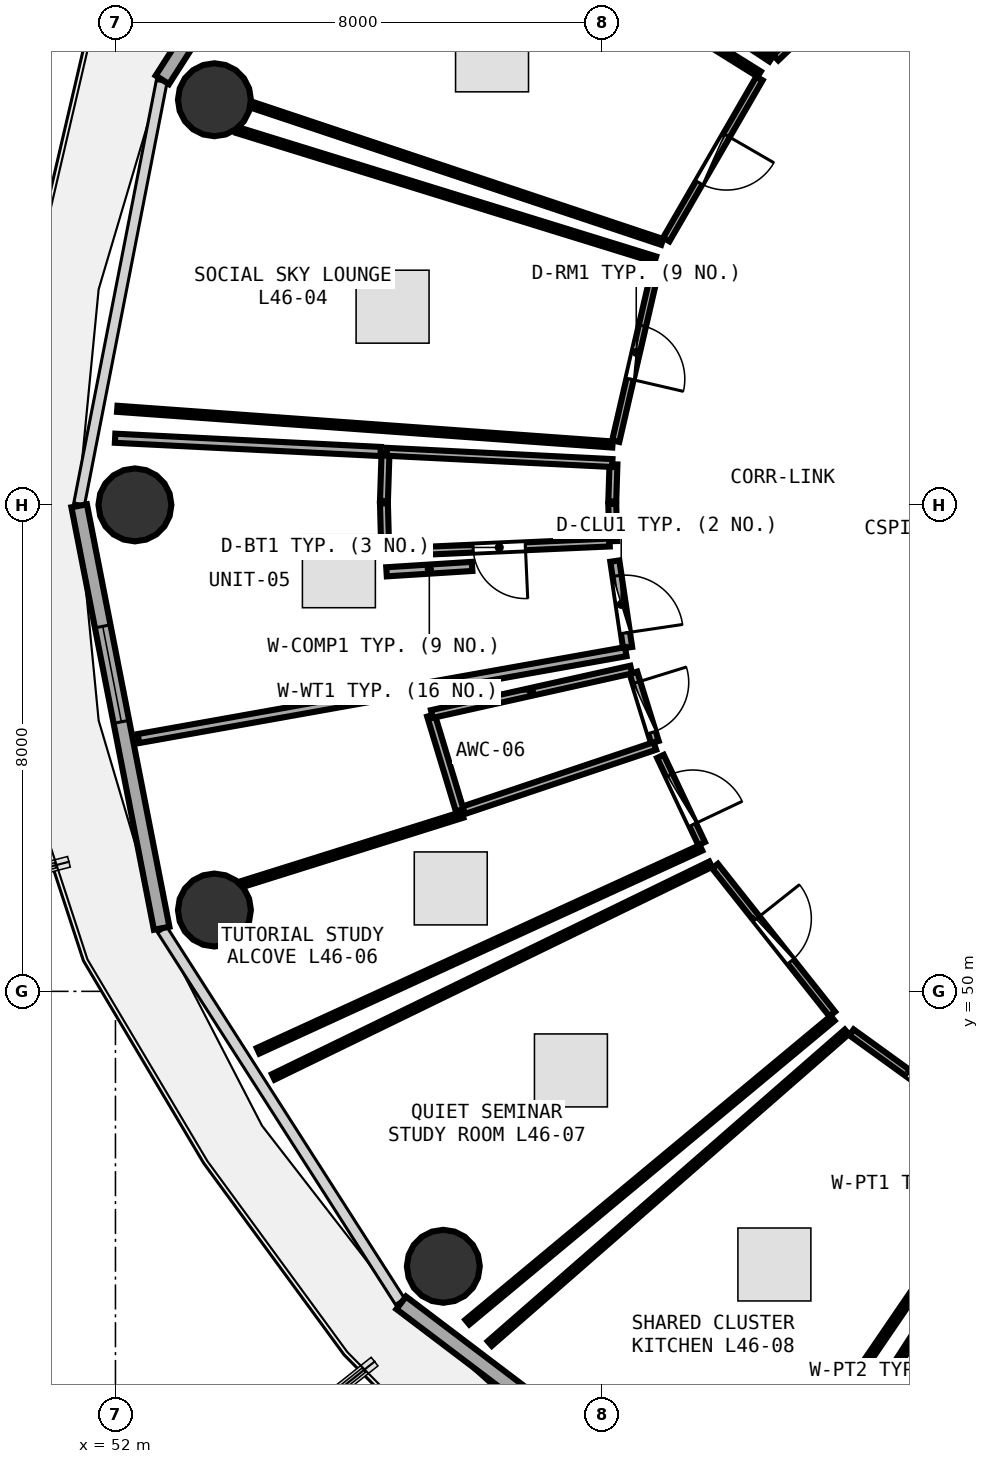
"""IFC4 building model, lengths in metres.
Left out: names, types, materials, properties, quantities, classifications, styles, units other than length and angle.
Written with IfcOpenShell. Run it as: python <this file> out.ifc"""

import sys

from ifc_helpers import new_model, si_unit, direction, frame, frame_2d, origin, origin_2d, place, context, subcontext, project, spatial, rectangle, circle, extrude, element, fill, save


model = new_model("IFC4")
c1 = context("Model", 3, precision=1e-05, world=origin(), true_north=direction((0.0, 1.0)))
c2 = subcontext(c1, "Body", "Model", "MODEL_VIEW")
j1 = project(units=[si_unit("LENGTHUNIT", "METRE"), si_unit("PLANEANGLEUNIT", "RADIAN")], contexts=[c1])
p1 = place(None, origin())
s1 = spatial("IfcSite", under=j1, at=p1, CompositionType="ELEMENT")
p2 = place(p1, origin())
s2 = spatial("IfcBuilding", under=s1, at=p2, CompositionType="ELEMENT")
p3 = place(p2, frame((0.0, 0.0, 180.6)))
s3 = spatial("IfcBuildingStorey", under=s2, at=p3, CompositionType="ELEMENT", Elevation=180.6)
for number, where, z_axis, x_axis in (
    (1, (53.627, 64.663, 0.0), (0.0, 0.0, 1.0), (1.0, 0.0, 0.0)),
    (2, (52.32, 58.0, 0.0), (0.0, 0.0, 1.0), (1.0, 0.0, 0.0)),
    (3, (53.627, 51.337, 0.0), (0.0, 0.0, 1.0), (1.0, 0.0, 0.0)),
    (4, (57.392, 45.479, 0.0), (0.0, 0.0, 1.0), (1.0, 0.0, 0.0)),
):
    element("IfcColumn", number, at=place(p3, frame(where, z_axis=z_axis, x_axis=x_axis)), inside=s3, PredefinedType="COLUMN", context=c2, shape_type="SweptSolid", body=[
        extrude(circle(Radius=0.6, at=origin_2d()), origin(), (0.0, 0.0, 1.0), 3.75),
    ])
p4 = place(p3, frame((56.679, 71.1, 0.0), z_axis=(0.0, 0.0, 1.0), x_axis=(-0.538801521808, -0.842432739213, 0.0)))
e5 = element("IfcWall", 5, at=p4, inside=s3, PredefinedType="SOLIDWALL", context=c2, shape_type="SweptSolid", body=[
    extrude(rectangle(XDim=7.253, YDim=0.26, at=frame_2d((3.627, 0.0))), origin(), (0.0, 0.0, 1.0), 3.475),
])
p5 = place(p4, frame((3.152, 0.0, 0.0)))
e6 = element("IfcOpeningElement", 6, at=p5, cuts=e5, PredefinedType="OPENING", context=c2, shape_type="SweptSolid", body=[
    extrude(rectangle(XDim=0.95, YDim=2.1, at=frame_2d((0.475, 1.05))), frame((0.0, 0.14, 0.0), z_axis=(0.0, -1.0, 0.0), x_axis=(1.0, 0.0, 0.0)), (0.0, 0.0, 1.0), 0.28),
])
p6 = place(p4, frame((4.452, 0.0, 0.85)))
e7 = element("IfcOpeningElement", 7, at=p6, cuts=e5, PredefinedType="OPENING", context=c2, shape_type="SweptSolid", body=[
    extrude(rectangle(XDim=1.2, YDim=1.45, at=frame_2d((0.6, 0.725))), frame((0.0, 0.14, 0.0), z_axis=(0.0, -1.0, 0.0), x_axis=(1.0, 0.0, 0.0)), (0.0, 0.0, 1.0), 0.28),
])
p7 = place(p3, frame((51.403, 57.985, 0.0), z_axis=(0.0, 0.0, 1.0), x_axis=(0.191716984769, -0.981450252306, 0.0)))
e8 = element("IfcWall", 8, at=p7, inside=s3, PredefinedType="SOLIDWALL", context=c2, shape_type="SweptSolid", body=[
    extrude(rectangle(XDim=7.079, YDim=0.26, at=frame_2d((3.54, 0.0))), origin(), (0.0, 0.0, 1.0), 3.475),
])
p8 = place(p7, frame((2.02, 0.0, 0.85)))
e9 = element("IfcOpeningElement", 9, at=p8, cuts=e8, PredefinedType="OPENING", context=c2, shape_type="SweptSolid", body=[
    extrude(rectangle(XDim=1.6, YDim=1.45, at=frame_2d((0.8, 0.725))), frame((0.0, 0.14, 0.0), z_axis=(0.0, -1.0, 0.0), x_axis=(1.0, 0.0, 0.0)), (0.0, 0.0, 1.0), 0.28),
])
p9 = place(p3, frame((56.699, 44.878, 0.0), z_axis=(0.0, 0.0, 1.0), x_axis=(0.797163719609, -0.603763202042, 0.0)))
e10 = element("IfcWall", 10, at=p9, inside=s3, PredefinedType="SOLIDWALL", context=c2, shape_type="SweptSolid", body=[
    extrude(rectangle(XDim=7.512, YDim=0.26, at=frame_2d((3.756, 0.0))), origin(), (0.0, 0.0, 1.0), 3.475),
])
p10 = place(p9, frame((2.956, 0.0, 0.85)))
e11 = element("IfcOpeningElement", 11, at=p10, cuts=e10, PredefinedType="OPENING", context=c2, shape_type="SweptSolid", body=[
    extrude(rectangle(XDim=1.6, YDim=1.45, at=frame_2d((0.8, 0.725))), frame((0.0, 0.14, 0.0), z_axis=(0.0, -1.0, 0.0), x_axis=(1.0, 0.0, 0.0)), (0.0, 0.0, 1.0), 0.28),
])
p11 = place(p3, frame((65.135, 67.531, 0.0), z_axis=(0.0, 0.0, 1.0), x_axis=(-0.722401093559, -0.691474265627, 0.0)))
e12 = element("IfcWall", 12, at=p11, inside=s3, PredefinedType="PARTITIONING", context=c2, shape_type="SweptSolid", body=[
    extrude(rectangle(XDim=3.15, YDim=0.12, at=frame_2d((1.575, 0.0))), origin(), (0.0, 0.0, 1.0), 2.975),
])
p12 = place(p11, frame((1.125, 0.0, 0.0)))
e13 = element("IfcOpeningElement", 13, at=p12, cuts=e12, PredefinedType="OPENING", context=c2, shape_type="SweptSolid", body=[
    extrude(rectangle(XDim=0.9, YDim=2.08, at=frame_2d((0.45, 1.04))), frame((0.0, 0.07, 0.0), z_axis=(0.0, -1.0, 0.0), x_axis=(1.0, 0.0, 0.0)), (0.0, 0.0, 1.0), 0.14),
])
p13 = place(p3, frame((62.591, 65.012, 0.0), z_axis=(0.0, 0.0, 1.0), x_axis=(-0.500746842293, -0.865593784598, 0.0)))
e14 = element("IfcWall", 14, at=p13, inside=s3, PredefinedType="PARTITIONING", context=c2, shape_type="SweptSolid", body=[
    extrude(rectangle(XDim=3.059, YDim=0.12, at=frame_2d((1.53, 0.0))), origin(), (0.0, 0.0, 1.0), 2.975),
])
p14 = place(p13, frame((1.08, 0.0, 0.0)))
e15 = element("IfcOpeningElement", 15, at=p14, cuts=e14, PredefinedType="OPENING", context=c2, shape_type="SweptSolid", body=[
    extrude(rectangle(XDim=0.9, YDim=2.08, at=frame_2d((0.45, 1.04))), frame((0.0, 0.07, 0.0), z_axis=(0.0, -1.0, 0.0), x_axis=(1.0, 0.0, 0.0)), (0.0, 0.0, 1.0), 0.14),
])
p15 = place(p3, frame((60.903, 61.968, 0.0), z_axis=(0.0, 0.0, 1.0), x_axis=(-0.225317744346, -0.974285335045, 0.0)))
e16 = element("IfcWall", 16, at=p15, inside=s3, PredefinedType="PARTITIONING", context=c2, shape_type="SweptSolid", body=[
    extrude(rectangle(XDim=2.996, YDim=0.12, at=frame_2d((1.498, 0.0))), origin(), (0.0, 0.0, 1.0), 3.48),
])
p16 = place(p15, frame((1.048, 0.0, 0.0)))
e17 = element("IfcOpeningElement", 17, at=p16, cuts=e16, PredefinedType="OPENING", context=c2, shape_type="SweptSolid", body=[
    extrude(rectangle(XDim=0.9, YDim=2.08, at=frame_2d((0.45, 1.04))), frame((0.0, 0.07, 0.0), z_axis=(0.0, -1.0, 0.0), x_axis=(1.0, 0.0, 0.0)), (0.0, 0.0, 1.0), 0.14),
])
p17 = place(p3, frame((60.127, 57.381, 0.0), z_axis=(0.0, 0.0, 1.0), x_axis=(-0.998998516644, -0.044743309488, 0.0)))
e18 = element("IfcWall", 18, at=p17, inside=s3, PredefinedType="PLUMBINGWALL", context=c2, shape_type="SweptSolid", body=[
    extrude(rectangle(XDim=3.634, YDim=0.13, at=frame_2d((1.817, 0.0))), origin(), (0.0, 0.0, 1.0), 3.175),
])
p18 = place(p17, frame((1.387, 0.0, 0.0)))
e19 = element("IfcOpeningElement", 19, at=p18, cuts=e18, PredefinedType="OPENING", context=c2, shape_type="SweptSolid", body=[
    extrude(rectangle(XDim=0.86, YDim=2.05, at=frame_2d((0.43, 1.025))), frame((0.0, 0.075, 0.0), z_axis=(0.0, -1.0, 0.0), x_axis=(1.0, 0.0, 0.0)), (0.0, 0.0, 1.0), 0.15),
])
p19 = place(p3, frame((60.213, 57.076, 0.0), z_axis=(0.0, 0.0, 1.0), x_axis=(0.146099718117, -0.98926986832, 0.0)))
e20 = element("IfcWall", 20, at=p19, inside=s3, PredefinedType="PARTITIONING", context=c2, shape_type="SweptSolid", body=[
    extrude(rectangle(XDim=1.439, YDim=0.15, at=frame_2d((0.719, 0.0))), origin(), (0.0, 0.0, 1.0), 3.48),
])
p20 = place(p19, frame((0.244, 0.0, 0.0)))
e21 = element("IfcOpeningElement", 21, at=p20, cuts=e20, PredefinedType="OPENING", context=c2, shape_type="SweptSolid", body=[
    extrude(rectangle(XDim=0.95, YDim=2.08, at=frame_2d((0.475, 1.04))), frame((0.0, 0.085, 0.0), z_axis=(0.0, -1.0, 0.0), x_axis=(1.0, 0.0, 0.0)), (0.0, 0.0, 1.0), 0.17),
])
p21 = place(p3, frame((60.519, 55.239, 0.0), z_axis=(0.0, 0.0, 1.0), x_axis=(0.296096905528, -0.955157904504, 0.0)))
e22 = element("IfcWall", 22, at=p21, inside=s3, PredefinedType="PLUMBINGWALL", context=c2, shape_type="SweptSolid", body=[
    extrude(rectangle(XDim=1.194, YDim=0.13, at=frame_2d((0.597, 0.0))), origin(), (0.0, 0.0, 1.0), 3.48),
])
p22 = place(p21, frame((0.167, 0.0, 0.0)))
e23 = element("IfcOpeningElement", 23, at=p22, cuts=e22, PredefinedType="OPENING", context=c2, shape_type="SweptSolid", body=[
    extrude(rectangle(XDim=0.86, YDim=2.05, at=frame_2d((0.43, 1.025))), frame((0.0, 0.075, 0.0), z_axis=(0.0, -1.0, 0.0), x_axis=(1.0, 0.0, 0.0)), (0.0, 0.0, 1.0), 0.15),
])
p23 = place(p3, frame((60.963, 53.864, 0.0), z_axis=(0.0, 0.0, 1.0), x_axis=(0.427397920828, -0.904063613509, 0.0)))
e24 = element("IfcWall", 24, at=p23, inside=s3, PredefinedType="PARTITIONING", context=c2, shape_type="SweptSolid", body=[
    extrude(rectangle(XDim=1.586, YDim=0.12, at=frame_2d((0.793, 0.0))), origin(), (0.0, 0.0, 1.0), 3.235),
])
p24 = place(p23, frame((0.343, 0.0, 0.0)))
e25 = element("IfcOpeningElement", 25, at=p24, cuts=e24, PredefinedType="OPENING", context=c2, shape_type="SweptSolid", body=[
    extrude(rectangle(XDim=0.9, YDim=2.08, at=frame_2d((0.45, 1.04))), frame((0.0, 0.07, 0.0), z_axis=(0.0, -1.0, 0.0), x_axis=(1.0, 0.0, 0.0)), (0.0, 0.0, 1.0), 0.14),
])
p25 = place(p3, frame((61.86, 52.06, 0.0), z_axis=(0.0, 0.0, 1.0), x_axis=(0.621061577605, -0.783761773005, 0.0)))
e26 = element("IfcWall", 26, at=p25, inside=s3, PredefinedType="PARTITIONING", context=c2, shape_type="SweptSolid", body=[
    extrude(rectangle(XDim=3.103, YDim=0.12, at=frame_2d((1.552, 0.0))), origin(), (0.0, 0.0, 1.0), 2.975),
])
p26 = place(p25, frame((1.102, 0.0, 0.0)))
e27 = element("IfcOpeningElement", 27, at=p26, cuts=e26, PredefinedType="OPENING", context=c2, shape_type="SweptSolid", body=[
    extrude(rectangle(XDim=0.9, YDim=2.08, at=frame_2d((0.45, 1.04))), frame((0.0, 0.07, 0.0), z_axis=(0.0, -1.0, 0.0), x_axis=(1.0, 0.0, 0.0)), (0.0, 0.0, 1.0), 0.14),
])
p27 = place(p3, frame((64.106, 49.325, 0.0), z_axis=(0.0, 0.0, 1.0), x_axis=(0.810538273734, -0.585685672364, 0.0)))
e28 = element("IfcWall", 28, at=p27, inside=s3, PredefinedType="PARTITIONING", context=c2, shape_type="SweptSolid", body=[
    extrude(rectangle(XDim=3.198, YDim=0.12, at=frame_2d((1.599, 0.0))), origin(), (0.0, 0.0, 1.0), 2.975),
])
p28 = place(p27, frame((1.149, 0.0, 0.0)))
e29 = element("IfcOpeningElement", 29, at=p28, cuts=e28, PredefinedType="OPENING", context=c2, shape_type="SweptSolid", body=[
    extrude(rectangle(XDim=0.9, YDim=2.08, at=frame_2d((0.45, 1.04))), frame((0.0, 0.07, 0.0), z_axis=(0.0, -1.0, 0.0), x_axis=(1.0, 0.0, 0.0)), (0.0, 0.0, 1.0), 0.14),
])
p29 = place(p3, frame((62.783, 65.334, 0.0), z_axis=(0.0, 0.0, 1.0), x_axis=(-0.835790537916, 0.549048428401, 0.0)))
e30 = element("IfcWall", 30, at=p29, inside=s3, PredefinedType="PARTITIONING", context=c2, shape_type="SweptSolid", body=[
    extrude(rectangle(XDim=7.903, YDim=0.1, at=frame_2d((3.952, 0.0))), origin(), (0.0, 0.0, 1.0), 3.025),
])
p30 = place(p3, frame((60.991, 62.325, 0.0), z_axis=(0.0, 0.0, 1.0), x_axis=(-0.948483978449, 0.316825097847, 0.0)))
e31 = element("IfcWall", 31, at=p30, inside=s3, PredefinedType="PARTITIONING", context=c2, shape_type="SweptSolid", body=[
    extrude(rectangle(XDim=7.111, YDim=0.1, at=frame_2d((3.555, 0.0))), origin(), (0.0, 0.0, 1.0), 2.975),
])
p31 = place(p3, frame((55.866, 69.277, 0.0), z_axis=(0.0, 0.0, 1.0), x_axis=(0.84851390129, -0.529173090129, 0.0)))
e32 = element("IfcWall", 32, at=p31, inside=s3, PredefinedType="PARTITIONING", context=c2, shape_type="SweptSolid", body=[
    extrude(rectangle(XDim=7.921, YDim=0.1, at=frame_2d((3.96, 0.0))), origin(), (0.0, 0.0, 1.0), 2.975),
])
p32 = place(p3, frame((60.174, 58.993, 0.0), z_axis=(0.0, 0.0, 1.0), x_axis=(-0.997411279475, 0.071907854766, 0.0)))
e33 = element("IfcWall", 33, at=p32, inside=s3, PredefinedType="PARTITIONING", context=c2, shape_type="SweptSolid", body=[
    extrude(rectangle(XDim=8.166, YDim=0.1, at=frame_2d((4.083, 0.0))), origin(), (0.0, 0.0, 1.0), 3.025),
])
p33 = place(p3, frame((54.003, 64.163, 0.0), z_axis=(0.0, 0.0, 1.0), x_axis=(0.955390108929, -0.295346812679, 0.0)))
e34 = element("IfcWall", 34, at=p33, inside=s3, PredefinedType="PARTITIONING", context=c2, shape_type="SweptSolid", body=[
    extrude(rectangle(XDim=7.196, YDim=0.1, at=frame_2d((3.598, 0.0))), origin(), (0.0, 0.0, 1.0), 3.175),
])
p34 = place(p3, frame((60.19, 58.667, 0.0), z_axis=(0.0, 0.0, 1.0), x_axis=(-0.032292682442, -0.999478455326, 0.0)))
e35 = element("IfcWall", 35, at=p34, inside=s3, PredefinedType="PLUMBINGWALL", context=c2, shape_type="SweptSolid", body=[
    extrude(rectangle(XDim=0.612, YDim=0.13, at=frame_2d((0.306, 0.0))), origin(), (0.0, 0.0, 1.0), 2.975),
])
p35 = place(p3, frame((60.17, 58.015, 0.0), z_axis=(0.0, 0.0, 1.0), x_axis=(0.026369723842, -0.99965225837, 0.0)))
e36 = element("IfcWall", 36, at=p35, inside=s3, PredefinedType="PLUMBINGWALL", context=c2, shape_type="SweptSolid", body=[
    extrude(rectangle(XDim=0.611, YDim=0.13, at=frame_2d((0.306, 0.0))), origin(), (0.0, 0.0, 1.0), 2.975),
])
p36 = place(p3, frame((56.437, 57.236, 0.0), z_axis=(0.0, 0.0, 1.0), x_axis=(-0.026607722643, 0.999645951873, 0.0)))
e37 = element("IfcWall", 37, at=p36, inside=s3, PredefinedType="PLUMBINGWALL", context=c2, shape_type="SweptSolid", body=[
    extrude(rectangle(XDim=0.789, YDim=0.13, at=frame_2d((0.395, 0.0))), origin(), (0.0, 0.0, 1.0), 2.975),
])
p37 = place(p3, frame((56.416, 58.065, 0.0), z_axis=(0.0, 0.0, 1.0), x_axis=(0.03247049286, 0.999472694521, 0.0)))
e38 = element("IfcWall", 38, at=p37, inside=s3, PredefinedType="PLUMBINGWALL", context=c2, shape_type="SweptSolid", body=[
    extrude(rectangle(XDim=0.79, YDim=0.13, at=frame_2d((0.395, 0.0))), origin(), (0.0, 0.0, 1.0), 2.975),
])
p38 = place(p3, frame((56.462, 58.873, 0.0), z_axis=(0.0, 0.0, 1.0), x_axis=(0.998757579638, -0.049832691243, 0.0)))
e39 = element("IfcWall", 39, at=p38, inside=s3, PredefinedType="PLUMBINGWALL", context=c2, shape_type="SweptSolid", body=[
    extrude(rectangle(XDim=3.714, YDim=0.13, at=frame_2d((1.857, 0.0))), origin(), (0.0, 0.0, 1.0), 3.175),
])
p39 = place(p3, frame((60.393, 55.586, 0.0), z_axis=(0.0, 0.0, 1.0), x_axis=(-0.984476835755, -0.175514557407, 0.0)))
e40 = element("IfcWall", 40, at=p39, inside=s3, PredefinedType="PARTITIONING", context=c2, shape_type="SweptSolid", body=[
    extrude(rectangle(XDim=8.142, YDim=0.15, at=frame_2d((4.071, 0.0))), origin(), (0.0, 0.0, 1.0), 3.025),
])
p40 = place(p3, frame((51.994, 59.096, 0.0), z_axis=(0.0, 0.0, 1.0), x_axis=(0.998756789481, -0.049848525207, 0.0)))
e41 = element("IfcWall", 41, at=p40, inside=s3, PredefinedType="PARTITIONING", context=c2, shape_type="SweptSolid", body=[
    extrude(rectangle(XDim=4.374, YDim=0.15, at=frame_2d((2.187, 0.0))), origin(), (0.0, 0.0, 1.0), 3.025),
])
p41 = place(p3, frame((56.458, 56.899, 0.0), z_axis=(0.0, 0.0, 1.0), x_axis=(0.998023505666, 0.062841722907, 0.0)))
e42 = element("IfcWall", 42, at=p41, inside=s3, PredefinedType="PARTITIONING", context=c2, shape_type="SweptSolid", body=[
    extrude(rectangle(XDim=1.41, YDim=0.15, at=frame_2d((0.705, 0.0))), origin(), (0.0, 0.0, 1.0), 3.175),
])
p42 = place(p3, frame((60.871, 54.035, 0.0), z_axis=(0.0, 0.0, 1.0), x_axis=(-0.947910298115, -0.318537386704, 0.0)))
e43 = element("IfcWall", 43, at=p42, inside=s3, PredefinedType="PLUMBINGWALL", context=c2, shape_type="SweptSolid", body=[
    extrude(rectangle(XDim=3.36, YDim=0.13, at=frame_2d((1.68, 0.0))), origin(), (0.0, 0.0, 1.0), 3.175),
])
p43 = place(p3, frame((57.661, 52.977, 0.0), z_axis=(0.0, 0.0, 1.0), x_axis=(-0.289861876094, 0.957068489079, 0.0)))
e44 = element("IfcWall", 44, at=p43, inside=s3, PredefinedType="PLUMBINGWALL", context=c2, shape_type="SweptSolid", body=[
    extrude(rectangle(XDim=1.63, YDim=0.13, at=frame_2d((0.815, 0.0))), origin(), (0.0, 0.0, 1.0), 3.48),
])
p44 = place(p3, frame((57.202, 54.56, 0.0), z_axis=(0.0, 0.0, 1.0), x_axis=(0.976027779337, 0.217645983107, 0.0)))
e45 = element("IfcWall", 45, at=p44, inside=s3, PredefinedType="PLUMBINGWALL", context=c2, shape_type="SweptSolid", body=[
    extrude(rectangle(XDim=3.36, YDim=0.13, at=frame_2d((1.68, 0.0))), origin(), (0.0, 0.0, 1.0), 3.175),
])
p45 = place(p3, frame((61.63, 52.359, 0.0), z_axis=(0.0, 0.0, 1.0), x_axis=(-0.909155211227, -0.416457443083, 0.0)))
e46 = element("IfcWall", 46, at=p45, inside=s3, PredefinedType="PARTITIONING", context=c2, shape_type="SweptSolid", body=[
    extrude(rectangle(XDim=8.012, YDim=0.1, at=frame_2d((4.006, 0.0))), origin(), (0.0, 0.0, 1.0), 2.975),
])
p46 = place(p3, frame((54.083, 51.765, 0.0), z_axis=(0.0, 0.0, 1.0), x_axis=(0.954047805858, 0.299654441212, 0.0)))
e47 = element("IfcWall", 47, at=p46, inside=s3, PredefinedType="PARTITIONING", context=c2, shape_type="SweptSolid", body=[
    extrude(rectangle(XDim=3.798, YDim=0.1, at=frame_2d((1.899, 0.0))), origin(), (0.0, 0.0, 1.0), 3.235),
])
p47 = place(p3, frame((63.794, 49.555, 0.0), z_axis=(0.0, 0.0, 1.0), x_axis=(-0.768927769446, -0.639335659396, 0.0)))
e48 = element("IfcWall", 48, at=p47, inside=s3, PredefinedType="PARTITIONING", context=c2, shape_type="SweptSolid", body=[
    extrude(rectangle(XDim=7.812, YDim=0.1, at=frame_2d((3.906, 0.0))), origin(), (0.0, 0.0, 1.0), 2.975),
])
p48 = place(p3, frame((54.595, 48.593, 0.0), z_axis=(0.0, 0.0, 1.0), x_axis=(0.899324003441, 0.437282902518, 0.0)))
e49 = element("IfcWall", 49, at=p48, inside=s3, PredefinedType="PARTITIONING", context=c2, shape_type="SweptSolid", body=[
    extrude(rectangle(XDim=7.997, YDim=0.1, at=frame_2d((3.999, 0.0))), origin(), (0.0, 0.0, 1.0), 2.975),
])
p49 = place(p3, frame((66.723, 47.384, 0.0), z_axis=(0.0, 0.0, 1.0), x_axis=(-0.563521193737, -0.826101606468, 0.0)))
e50 = element("IfcWall", 50, at=p49, inside=s3, PredefinedType="PARTITIONING", context=c2, shape_type="SweptSolid", body=[
    extrude(rectangle(XDim=6.944, YDim=0.1, at=frame_2d((3.472, 0.0))), origin(), (0.0, 0.0, 1.0), 2.975),
])
p50 = place(p3, frame((58.156, 44.208, 0.0), z_axis=(0.0, 0.0, 1.0), x_axis=(0.753307828271, 0.657668089438, 0.0)))
e51 = element("IfcWall", 51, at=p50, inside=s3, PredefinedType="PARTITIONING", context=c2, shape_type="SweptSolid", body=[
    extrude(rectangle(XDim=7.793, YDim=0.1, at=frame_2d((3.897, 0.0))), origin(), (0.0, 0.0, 1.0), 3.025),
])
p51 = place(p3, frame((63.44, 41.689, 0.0), z_axis=(0.0, 0.0, 1.0), x_axis=(0.542254246964, 0.840214455749, 0.0)))
e52 = element("IfcWall", 52, at=p51, inside=s3, PredefinedType="PARTITIONING", context=c2, shape_type="SweptSolid", body=[
    extrude(rectangle(XDim=6.592, YDim=0.1, at=frame_2d((3.296, 0.0))), origin(), (0.0, 0.0, 1.0), 2.975),
])
p52 = place(p8, origin())
e53 = element("IfcWindow", 53, at=p52, inside=s3, PartitioningType="SINGLE_PANEL", PredefinedType="WINDOW", context=c2, shape_type="SweptSolid", body=[
    extrude(rectangle(XDim=1.6, YDim=1.45, at=frame_2d((0.8, 0.725))), frame((0.0, 0.03, 0.0), z_axis=(0.0, -1.0, 0.0), x_axis=(1.0, 0.0, 0.0)), (0.0, 0.0, 1.0), 0.06),
])
fill(e9, e53)
p53 = place(p14, origin())
e54 = element("IfcDoor", 54, at=p53, inside=s3, OperationType="SINGLE_SWING_LEFT", PredefinedType="DOOR", context=c2, shape_type="SweptSolid", body=[
    extrude(rectangle(XDim=0.9, YDim=2.08, at=frame_2d((0.45, 1.04))), frame((0.0, 0.025, 0.0), z_axis=(0.0, -1.0, 0.0), x_axis=(1.0, 0.0, 0.0)), (0.0, 0.0, 1.0), 0.05),
])
fill(e15, e54)
p54 = place(p16, origin())
e55 = element("IfcDoor", 55, at=p54, inside=s3, OperationType="SINGLE_SWING_RIGHT", PredefinedType="DOOR", context=c2, shape_type="SweptSolid", body=[
    extrude(rectangle(XDim=0.9, YDim=2.08, at=frame_2d((0.45, 1.04))), frame((0.0, 0.025, 0.0), z_axis=(0.0, -1.0, 0.0), x_axis=(1.0, 0.0, 0.0)), (0.0, 0.0, 1.0), 0.05),
])
fill(e17, e55)
p55 = place(p18, origin())
e56 = element("IfcDoor", 56, at=p55, inside=s3, OperationType="SINGLE_SWING_LEFT", PredefinedType="DOOR", context=c2, shape_type="SweptSolid", body=[
    extrude(rectangle(XDim=0.86, YDim=2.05, at=frame_2d((0.43, 1.025))), frame((0.0, 0.025, 0.0), z_axis=(0.0, -1.0, 0.0), x_axis=(1.0, 0.0, 0.0)), (0.0, 0.0, 1.0), 0.05),
])
fill(e19, e56)
p56 = place(p20, origin())
e57 = element("IfcDoor", 57, at=p56, inside=s3, OperationType="SINGLE_SWING_RIGHT", PredefinedType="DOOR", context=c2, shape_type="SweptSolid", body=[
    extrude(rectangle(XDim=0.95, YDim=2.08, at=frame_2d((0.475, 1.04))), frame((0.0, 0.025, 0.0), z_axis=(0.0, -1.0, 0.0), x_axis=(1.0, 0.0, 0.0)), (0.0, 0.0, 1.0), 0.05),
])
fill(e21, e57)
p57 = place(p22, origin())
e58 = element("IfcDoor", 58, at=p57, inside=s3, OperationType="SINGLE_SWING_LEFT", PredefinedType="DOOR", context=c2, shape_type="SweptSolid", body=[
    extrude(rectangle(XDim=0.86, YDim=2.05, at=frame_2d((0.43, 1.025))), frame((0.0, 0.025, 0.0), z_axis=(0.0, -1.0, 0.0), x_axis=(1.0, 0.0, 0.0)), (0.0, 0.0, 1.0), 0.05),
])
fill(e23, e58)
p58 = place(p24, origin())
e59 = element("IfcDoor", 59, at=p58, inside=s3, OperationType="SINGLE_SWING_RIGHT", PredefinedType="DOOR", context=c2, shape_type="SweptSolid", body=[
    extrude(rectangle(XDim=0.9, YDim=2.08, at=frame_2d((0.45, 1.04))), frame((0.0, 0.025, 0.0), z_axis=(0.0, -1.0, 0.0), x_axis=(1.0, 0.0, 0.0)), (0.0, 0.0, 1.0), 0.05),
])
fill(e25, e59)
p59 = place(p26, origin())
e60 = element("IfcDoor", 60, at=p59, inside=s3, OperationType="SINGLE_SWING_LEFT", PredefinedType="DOOR", context=c2, shape_type="SweptSolid", body=[
    extrude(rectangle(XDim=0.9, YDim=2.08, at=frame_2d((0.45, 1.04))), frame((0.0, 0.025, 0.0), z_axis=(0.0, -1.0, 0.0), x_axis=(1.0, 0.0, 0.0)), (0.0, 0.0, 1.0), 0.05),
])
fill(e27, e60)
p60 = place(p28, origin())
e61 = element("IfcDoor", 61, at=p60, inside=s3, OperationType="SINGLE_SWING_RIGHT", PredefinedType="DOOR", context=c2, shape_type="SweptSolid", body=[
    extrude(rectangle(XDim=0.9, YDim=2.08, at=frame_2d((0.45, 1.04))), frame((0.0, 0.025, 0.0), z_axis=(0.0, -1.0, 0.0), x_axis=(1.0, 0.0, 0.0)), (0.0, 0.0, 1.0), 0.05),
])
fill(e29, e61)
save(model, sys.argv[1])
